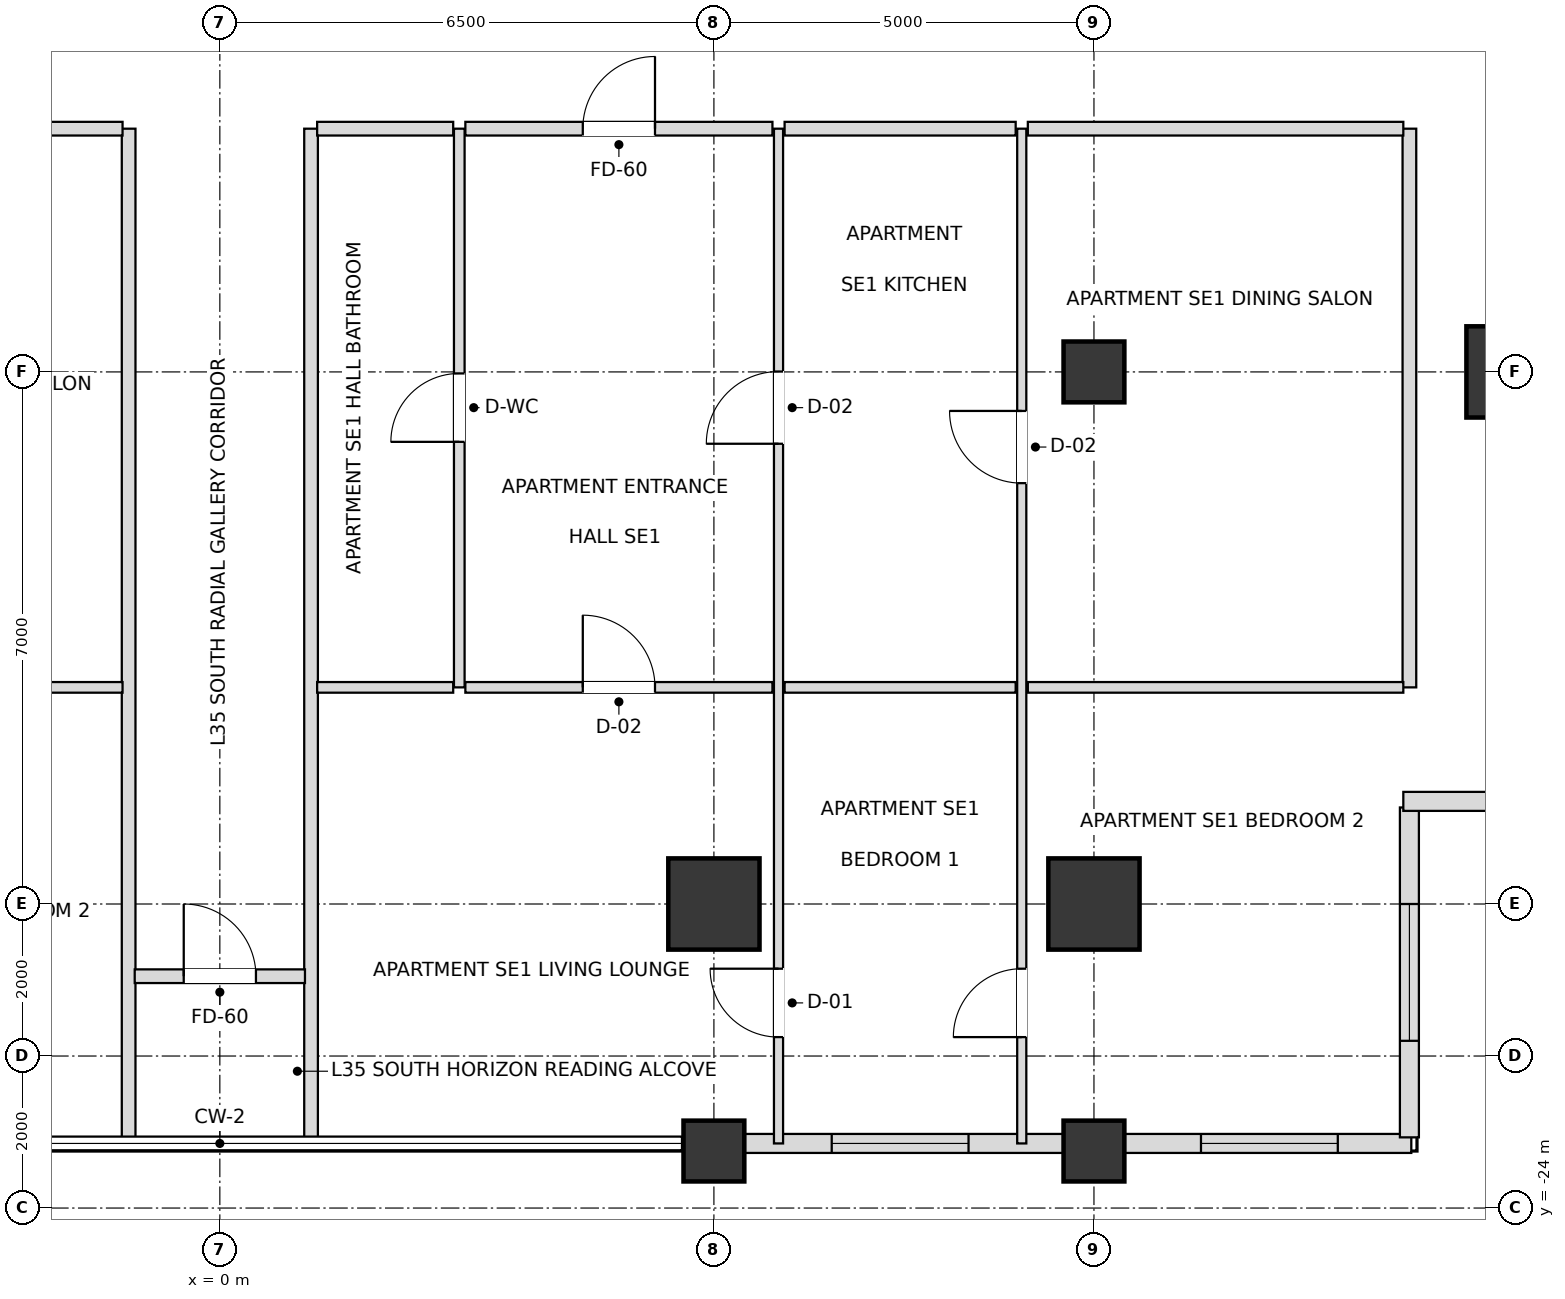
"""IFC4 building model, lengths in metres.
Left out: names, types, materials, properties, quantities, classifications, styles, units other than length and angle.
Written with IfcOpenShell. Run it as: python <this file> out.ifc"""

import sys

from ifc_helpers import new_model, si_unit, direction, frame, frame_2d, origin, origin_2d, place, context, subcontext, project, spatial, rectangle, extrude, element, fill, save


model = new_model("IFC4")
c1 = context("Model", 3, precision=1e-05, world=origin(), true_north=direction((0.0, 1.0)))
c2 = subcontext(c1, "Body", "Model", "MODEL_VIEW")
j1 = project(units=[si_unit("LENGTHUNIT", "METRE"), si_unit("PLANEANGLEUNIT", "RADIAN")], contexts=[c1])
p1 = place(None, origin())
s1 = spatial("IfcSite", under=j1, at=p1, CompositionType="ELEMENT")
p2 = place(p1, origin())
s2 = spatial("IfcBuilding", under=s1, at=p2, CompositionType="ELEMENT")
p3 = place(p2, frame((0.0, 0.0, 140.4)))
s3 = spatial("IfcBuildingStorey", under=s2, at=p3, CompositionType="ELEMENT", Elevation=140.4)
for number, where, z_axis, x_axis in (
    (1, (6.5, -20.0, 0.0), (0.0, 0.0, 1.0), (1.0, 0.0, 0.0)),
    (2, (11.5, -20.0, 0.0), (0.0, 0.0, 1.0), (1.0, 0.0, 0.0)),
    (3, (17.0, -13.0, 0.0), (0.0, 0.0, 1.0), (1.0, 0.0, 0.0)),
):
    element("IfcColumn", number, at=place(p3, frame(where, z_axis=z_axis, x_axis=x_axis)), inside=s3, PredefinedType="USERDEFINED", context=c2, shape_type="SweptSolid", body=[
        extrude(rectangle(XDim=1.2, YDim=1.2, at=origin_2d()), origin(), (0.0, 0.0, 1.0), 3.6),
    ])
for number, where, z_axis, x_axis in (
    (4, (11.5, -13.0, 0.0), (0.0, 0.0, 1.0), (1.0, 0.0, 0.0)),
    (5, (6.5, -23.25, 0.0), (0.0, 0.0, 1.0), (1.0, 0.0, 0.0)),
    (6, (11.5, -23.25, 0.0), (0.0, 0.0, 1.0), (1.0, 0.0, 0.0)),
):
    element("IfcColumn", number, at=place(p3, frame(where, z_axis=z_axis, x_axis=x_axis)), inside=s3, PredefinedType="COLUMN", context=c2, shape_type="SweptSolid", body=[
        extrude(rectangle(XDim=0.8, YDim=0.8, at=origin_2d()), origin(), (0.0, 0.0, 1.0), 3.6),
    ])
p4 = place(p3, frame((6.895, -23.15, 0.0), z_axis=(0.0, 0.0, 1.0), x_axis=(1.0, 0.0, 0.0)))
e7 = element("IfcWall", 7, at=p4, inside=s3, PredefinedType="SOLIDWALL", context=c2, shape_type="SweptSolid", body=[
    extrude(rectangle(XDim=4.21, YDim=0.25, at=frame_2d((2.105, 0.0))), origin(), (0.0, 0.0, 1.0), 2.736),
])
p5 = place(p4, frame((1.155, 0.0, 0.72)))
e8 = element("IfcOpeningElement", 8, at=p5, cuts=e7, PredefinedType="OPENING", context=c2, shape_type="SweptSolid", body=[
    extrude(rectangle(XDim=1.8, YDim=1.68, at=frame_2d((0.9, 0.84))), frame((0.0, 0.135, 0.0), z_axis=(0.0, -1.0, 0.0), x_axis=(1.0, 0.0, 0.0)), (0.0, 0.0, 1.0), 0.27),
])
p6 = place(p3, frame((11.895, -23.15, 0.0), z_axis=(0.0, 0.0, 1.0), x_axis=(1.0, 0.0, 0.0)))
e9 = element("IfcWall", 9, at=p6, inside=s3, PredefinedType="SOLIDWALL", context=c2, shape_type="SweptSolid", body=[
    extrude(rectangle(XDim=3.78, YDim=0.25, at=frame_2d((1.89, 0.0))), origin(), (0.0, 0.0, 1.0), 2.736),
])
p7 = place(p6, frame((1.013, 0.0, 0.72)))
e10 = element("IfcOpeningElement", 10, at=p7, cuts=e9, PredefinedType="OPENING", context=c2, shape_type="SweptSolid", body=[
    extrude(rectangle(XDim=1.8, YDim=1.68, at=frame_2d((0.9, 0.84))), frame((0.0, 0.135, 0.0), z_axis=(0.0, -1.0, 0.0), x_axis=(1.0, 0.0, 0.0)), (0.0, 0.0, 1.0), 0.27),
])
p8 = place(p3, frame((15.65, -23.07, 0.0), z_axis=(0.0, 0.0, 1.0), x_axis=(0.0, 1.0, 0.0)))
e11 = element("IfcWall", 11, at=p8, inside=s3, PredefinedType="SOLIDWALL", context=c2, shape_type="SweptSolid", body=[
    extrude(rectangle(XDim=4.34, YDim=0.25, at=frame_2d((2.17, 0.0))), origin(), (0.0, 0.0, 1.0), 2.736),
])
p9 = place(p8, frame((1.27, 0.0, 0.72)))
e12 = element("IfcOpeningElement", 12, at=p9, cuts=e11, PredefinedType="OPENING", context=c2, shape_type="SweptSolid", body=[
    extrude(rectangle(XDim=1.8, YDim=1.68, at=frame_2d((0.9, 0.84))), frame((0.0, 0.135, 0.0), z_axis=(0.0, -1.0, 0.0), x_axis=(1.0, 0.0, 0.0)), (0.0, 0.0, 1.0), 0.27),
])
p10 = place(p3, frame((15.57, -18.65, 0.0), z_axis=(0.0, 0.0, 1.0), x_axis=(1.0, 0.0, 0.0)))
e13 = element("IfcWall", 13, at=p10, inside=s3, PredefinedType="SOLIDWALL", context=c2, shape_type="SweptSolid", body=[
    extrude(rectangle(XDim=4.66, YDim=0.25, at=frame_2d((2.33, 0.0))), origin(), (0.0, 0.0, 1.0), 2.736),
])
p11 = place(p10, frame((1.43, 0.0, 0.72)))
e14 = element("IfcOpeningElement", 14, at=p11, cuts=e13, PredefinedType="OPENING", context=c2, shape_type="SweptSolid", body=[
    extrude(rectangle(XDim=1.8, YDim=1.68, at=frame_2d((0.9, 0.84))), frame((0.0, 0.135, 0.0), z_axis=(0.0, -1.0, 0.0), x_axis=(1.0, 0.0, 0.0)), (0.0, 0.0, 1.0), 0.27),
])
for number, where, z_axis, x_axis in (
    (15, (-1.2, -23.15, 0.0), (0.0, 0.0, 1.0), (0.0, 1.0, 0.0)),
    (16, (1.2, -23.15, 0.0), (0.0, 0.0, 1.0), (0.0, 1.0, 0.0)),
):
    element("IfcWall", number, at=place(p3, frame(where, z_axis=z_axis, x_axis=x_axis)), inside=s3, PredefinedType="PARTITIONING", context=c2, shape_type="SweptSolid", body=[
        extrude(rectangle(XDim=13.35, YDim=0.18, at=frame_2d((6.675, 0.0))), origin(), (0.0, 0.0, 1.0), 2.816),
    ])
p12 = place(p3, frame((3.15, -17.15, 0.0), z_axis=(0.0, 0.0, 1.0), x_axis=(0.0, 1.0, 0.0)))
e17 = element("IfcWall", 17, at=p12, inside=s3, PredefinedType="PARTITIONING", context=c2, shape_type="SweptSolid", body=[
    extrude(rectangle(XDim=7.35, YDim=0.14, at=frame_2d((3.675, 0.0))), origin(), (0.0, 0.0, 1.0), 3.38),
])
p13 = place(p12, frame((3.23, 0.0, 0.0)))
e18 = element("IfcOpeningElement", 18, at=p13, cuts=e17, PredefinedType="OPENING", context=c2, shape_type="SweptSolid", body=[
    extrude(rectangle(XDim=0.9, YDim=2.1, at=frame_2d((0.45, 1.05))), frame((0.0, 0.08, 0.0), z_axis=(0.0, -1.0, 0.0), x_axis=(1.0, 0.0, 0.0)), (0.0, 0.0, 1.0), 0.16),
])
p14 = place(p3, frame((7.35, -23.15, 0.0), z_axis=(0.0, 0.0, 1.0), x_axis=(0.0, 1.0, 0.0)))
e19 = element("IfcWall", 19, at=p14, inside=s3, PredefinedType="PARTITIONING", context=c2, shape_type="SweptSolid", body=[
    extrude(rectangle(XDim=13.35, YDim=0.12, at=frame_2d((6.675, 0.0))), origin(), (0.0, 0.0, 1.0), 2.816),
])
p15 = place(p14, frame((9.205, 0.0, 0.0)))
e20 = element("IfcOpeningElement", 20, at=p15, cuts=e19, PredefinedType="OPENING", context=c2, shape_type="SweptSolid", body=[
    extrude(rectangle(XDim=0.95, YDim=2.1, at=frame_2d((0.475, 1.05))), frame((0.0, 0.07, 0.0), z_axis=(0.0, -1.0, 0.0), x_axis=(1.0, 0.0, 0.0)), (0.0, 0.0, 1.0), 0.14),
])
p16 = place(p14, frame((1.399, 0.0, 0.0)))
e21 = element("IfcOpeningElement", 21, at=p16, cuts=e19, PredefinedType="OPENING", context=c2, shape_type="SweptSolid", body=[
    extrude(rectangle(XDim=0.9, YDim=2.1, at=frame_2d((0.45, 1.05))), frame((0.0, 0.07, 0.0), z_axis=(0.0, -1.0, 0.0), x_axis=(1.0, 0.0, 0.0)), (0.0, 0.0, 1.0), 0.14),
])
p17 = place(p3, frame((10.55, -23.15, 0.0), z_axis=(0.0, 0.0, 1.0), x_axis=(0.0, 1.0, 0.0)))
e22 = element("IfcWall", 22, at=p17, inside=s3, PredefinedType="PARTITIONING", context=c2, shape_type="SweptSolid", body=[
    extrude(rectangle(XDim=13.35, YDim=0.12, at=frame_2d((6.675, 0.0))), origin(), (0.0, 0.0, 1.0), 2.816),
])
p18 = place(p17, frame((8.687, 0.0, 0.0)))
e23 = element("IfcOpeningElement", 23, at=p18, cuts=e22, PredefinedType="OPENING", context=c2, shape_type="SweptSolid", body=[
    extrude(rectangle(XDim=0.95, YDim=2.1, at=frame_2d((0.475, 1.05))), frame((0.0, 0.07, 0.0), z_axis=(0.0, -1.0, 0.0), x_axis=(1.0, 0.0, 0.0)), (0.0, 0.0, 1.0), 0.14),
])
p19 = place(p17, frame((1.399, 0.0, 0.0)))
e24 = element("IfcOpeningElement", 24, at=p19, cuts=e22, PredefinedType="OPENING", context=c2, shape_type="SweptSolid", body=[
    extrude(rectangle(XDim=0.9, YDim=2.1, at=frame_2d((0.45, 1.05))), frame((0.0, 0.07, 0.0), z_axis=(0.0, -1.0, 0.0), x_axis=(1.0, 0.0, 0.0)), (0.0, 0.0, 1.0), 0.14),
])
p20 = place(p3, frame((15.65, -17.15, 0.0), z_axis=(0.0, 0.0, 1.0), x_axis=(0.0, 1.0, 0.0)))
e25 = element("IfcWall", 25, at=p20, inside=s3, PredefinedType="PARTITIONING", context=c2, shape_type="SweptSolid", body=[
    extrude(rectangle(XDim=7.35, YDim=0.18, at=frame_2d((3.675, 0.0))), origin(), (0.0, 0.0, 1.0), 2.736),
])
p21 = place(p3, frame((-1.12, -20.95, 0.0), z_axis=(0.0, 0.0, 1.0), x_axis=(1.0, 0.0, 0.0)))
e26 = element("IfcWall", 26, at=p21, inside=s3, PredefinedType="PARTITIONING", context=c2, shape_type="SweptSolid", body=[
    extrude(rectangle(XDim=2.24, YDim=0.18, at=frame_2d((1.12, 0.0))), origin(), (0.0, 0.0, 1.0), 3.38),
])
p22 = place(p21, frame((0.645, 0.0, 0.0)))
e27 = element("IfcOpeningElement", 27, at=p22, cuts=e26, PredefinedType="OPENING", context=c2, shape_type="SweptSolid", body=[
    extrude(rectangle(XDim=0.95, YDim=2.15, at=frame_2d((0.475, 1.075))), frame((0.0, 0.1, 0.0), z_axis=(0.0, -1.0, 0.0), x_axis=(1.0, 0.0, 0.0)), (0.0, 0.0, 1.0), 0.2),
])
p23 = place(p3, frame((-6.22, -17.15, 0.0), z_axis=(0.0, 0.0, 1.0), x_axis=(1.0, 0.0, 0.0)))
e28 = element("IfcWall", 28, at=p23, inside=s3, PredefinedType="PARTITIONING", context=c2, shape_type="SweptSolid", body=[
    extrude(rectangle(XDim=4.94, YDim=0.14, at=frame_2d((2.47, 0.0))), origin(), (0.0, 0.0, 1.0), 3.38),
])
p24 = place(p23, frame((1.995, 0.0, 0.0)))
e29 = element("IfcOpeningElement", 29, at=p24, cuts=e28, PredefinedType="OPENING", context=c2, shape_type="SweptSolid", body=[
    extrude(rectangle(XDim=0.95, YDim=2.1, at=frame_2d((0.475, 1.05))), frame((0.0, 0.08, 0.0), z_axis=(0.0, -1.0, 0.0), x_axis=(1.0, 0.0, 0.0)), (0.0, 0.0, 1.0), 0.16),
])
p25 = place(p3, frame((1.28, -17.15, 0.0), z_axis=(0.0, 0.0, 1.0), x_axis=(1.0, 0.0, 0.0)))
e30 = element("IfcWall", 30, at=p25, inside=s3, PredefinedType="PARTITIONING", context=c2, shape_type="SweptSolid", body=[
    extrude(rectangle(XDim=1.79, YDim=0.14, at=frame_2d((0.895, 0.0))), origin(), (0.0, 0.0, 1.0), 3.38),
])
p26 = place(p3, frame((3.23, -17.15, 0.0), z_axis=(0.0, 0.0, 1.0), x_axis=(1.0, 0.0, 0.0)))
e31 = element("IfcWall", 31, at=p26, inside=s3, PredefinedType="PARTITIONING", context=c2, shape_type="SweptSolid", body=[
    extrude(rectangle(XDim=4.04, YDim=0.14, at=frame_2d((2.02, 0.0))), origin(), (0.0, 0.0, 1.0), 2.816),
])
p27 = place(p26, frame((1.545, 0.0, 0.0)))
e32 = element("IfcOpeningElement", 32, at=p27, cuts=e31, PredefinedType="OPENING", context=c2, shape_type="SweptSolid", body=[
    extrude(rectangle(XDim=0.95, YDim=2.1, at=frame_2d((0.475, 1.05))), frame((0.0, 0.08, 0.0), z_axis=(0.0, -1.0, 0.0), x_axis=(1.0, 0.0, 0.0)), (0.0, 0.0, 1.0), 0.16),
])
p28 = place(p3, frame((7.43, -17.15, 0.0), z_axis=(0.0, 0.0, 1.0), x_axis=(1.0, 0.0, 0.0)))
e33 = element("IfcWall", 33, at=p28, inside=s3, PredefinedType="PARTITIONING", context=c2, shape_type="SweptSolid", body=[
    extrude(rectangle(XDim=3.04, YDim=0.14, at=frame_2d((1.52, 0.0))), origin(), (0.0, 0.0, 1.0), 3.38),
])
p29 = place(p3, frame((10.63, -17.15, 0.0), z_axis=(0.0, 0.0, 1.0), x_axis=(1.0, 0.0, 0.0)))
e34 = element("IfcWall", 34, at=p29, inside=s3, PredefinedType="PARTITIONING", context=c2, shape_type="SweptSolid", body=[
    extrude(rectangle(XDim=4.94, YDim=0.14, at=frame_2d((2.47, 0.0))), origin(), (0.0, 0.0, 1.0), 2.736),
])
p30 = place(p3, frame((-6.22, -9.8, 0.0), z_axis=(0.0, 0.0, 1.0), x_axis=(1.0, 0.0, 0.0)))
e35 = element("IfcWall", 35, at=p30, inside=s3, PredefinedType="PARTITIONING", context=c2, shape_type="SweptSolid", body=[
    extrude(rectangle(XDim=4.94, YDim=0.18, at=frame_2d((2.47, 0.0))), origin(), (0.0, 0.0, 1.0), 3.38),
])
p31 = place(p3, frame((1.28, -9.8, 0.0), z_axis=(0.0, 0.0, 1.0), x_axis=(1.0, 0.0, 0.0)))
e36 = element("IfcWall", 36, at=p31, inside=s3, PredefinedType="PARTITIONING", context=c2, shape_type="SweptSolid", body=[
    extrude(rectangle(XDim=1.79, YDim=0.18, at=frame_2d((0.895, 0.0))), origin(), (0.0, 0.0, 1.0), 3.38),
])
p32 = place(p3, frame((3.23, -9.8, 0.0), z_axis=(0.0, 0.0, 1.0), x_axis=(1.0, 0.0, 0.0)))
e37 = element("IfcWall", 37, at=p32, inside=s3, PredefinedType="PARTITIONING", context=c2, shape_type="SweptSolid", body=[
    extrude(rectangle(XDim=4.04, YDim=0.18, at=frame_2d((2.02, 0.0))), origin(), (0.0, 0.0, 1.0), 2.816),
])
p33 = place(p32, frame((1.545, 0.0, 0.0)))
e38 = element("IfcOpeningElement", 38, at=p33, cuts=e37, PredefinedType="OPENING", context=c2, shape_type="SweptSolid", body=[
    extrude(rectangle(XDim=0.95, YDim=2.15, at=frame_2d((0.475, 1.075))), frame((0.0, 0.1, 0.0), z_axis=(0.0, -1.0, 0.0), x_axis=(1.0, 0.0, 0.0)), (0.0, 0.0, 1.0), 0.2),
])
p34 = place(p3, frame((7.43, -9.8, 0.0), z_axis=(0.0, 0.0, 1.0), x_axis=(1.0, 0.0, 0.0)))
e39 = element("IfcWall", 39, at=p34, inside=s3, PredefinedType="PARTITIONING", context=c2, shape_type="SweptSolid", body=[
    extrude(rectangle(XDim=3.04, YDim=0.18, at=frame_2d((1.52, 0.0))), origin(), (0.0, 0.0, 1.0), 3.38),
])
p35 = place(p3, frame((10.63, -9.8, 0.0), z_axis=(0.0, 0.0, 1.0), x_axis=(1.0, 0.0, 0.0)))
e40 = element("IfcWall", 40, at=p35, inside=s3, PredefinedType="PARTITIONING", context=c2, shape_type="SweptSolid", body=[
    extrude(rectangle(XDim=4.94, YDim=0.18, at=frame_2d((2.47, 0.0))), origin(), (0.0, 0.0, 1.0), 3.38),
])
p36 = place(p5, origin())
e41 = element("IfcWindow", 41, at=p36, inside=s3, PartitioningType="SINGLE_PANEL", PredefinedType="WINDOW", context=c2, shape_type="SweptSolid", body=[
    extrude(rectangle(XDim=1.8, YDim=1.68, at=frame_2d((0.9, 0.84))), frame((0.0, 0.03, 0.0), z_axis=(0.0, -1.0, 0.0), x_axis=(1.0, 0.0, 0.0)), (0.0, 0.0, 1.0), 0.06),
])
fill(e8, e41)
p37 = place(p7, origin())
e42 = element("IfcWindow", 42, at=p37, inside=s3, PartitioningType="SINGLE_PANEL", PredefinedType="WINDOW", context=c2, shape_type="SweptSolid", body=[
    extrude(rectangle(XDim=1.8, YDim=1.68, at=frame_2d((0.9, 0.84))), frame((0.0, 0.03, 0.0), z_axis=(0.0, -1.0, 0.0), x_axis=(1.0, 0.0, 0.0)), (0.0, 0.0, 1.0), 0.06),
])
fill(e10, e42)
p38 = place(p9, origin())
e43 = element("IfcWindow", 43, at=p38, inside=s3, PartitioningType="SINGLE_PANEL", PredefinedType="WINDOW", context=c2, shape_type="SweptSolid", body=[
    extrude(rectangle(XDim=1.8, YDim=1.68, at=frame_2d((0.9, 0.84))), frame((0.0, 0.03, 0.0), z_axis=(0.0, -1.0, 0.0), x_axis=(1.0, 0.0, 0.0)), (0.0, 0.0, 1.0), 0.06),
])
fill(e12, e43)
p39 = place(p22, origin())
e44 = element("IfcDoor", 44, at=p39, inside=s3, OperationType="SINGLE_SWING_LEFT", PredefinedType="DOOR", context=c2, shape_type="SweptSolid", body=[
    extrude(rectangle(XDim=0.95, YDim=2.15, at=frame_2d((0.475, 1.075))), frame((0.0, 0.025, 0.0), z_axis=(0.0, -1.0, 0.0), x_axis=(1.0, 0.0, 0.0)), (0.0, 0.0, 1.0), 0.05),
])
fill(e27, e44)
p40 = place(p13, origin())
e45 = element("IfcDoor", 45, at=p40, inside=s3, OperationType="SINGLE_SWING_LEFT", PredefinedType="DOOR", context=c2, shape_type="SweptSolid", body=[
    extrude(rectangle(XDim=0.9, YDim=2.1, at=frame_2d((0.45, 1.05))), frame((0.0, 0.025, 0.0), z_axis=(0.0, -1.0, 0.0), x_axis=(1.0, 0.0, 0.0)), (0.0, 0.0, 1.0), 0.05),
])
fill(e18, e45)
p41 = place(p33, origin())
e46 = element("IfcDoor", 46, at=p41, inside=s3, OperationType="SINGLE_SWING_RIGHT", PredefinedType="DOOR", context=c2, shape_type="SweptSolid", body=[
    extrude(rectangle(XDim=0.95, YDim=2.15, at=frame_2d((0.475, 1.075))), frame((0.0, 0.025, 0.0), z_axis=(0.0, -1.0, 0.0), x_axis=(1.0, 0.0, 0.0)), (0.0, 0.0, 1.0), 0.05),
])
fill(e38, e46)
p42 = place(p15, origin())
e47 = element("IfcDoor", 47, at=p42, inside=s3, OperationType="SINGLE_SWING_LEFT", PredefinedType="DOOR", context=c2, shape_type="SweptSolid", body=[
    extrude(rectangle(XDim=0.95, YDim=2.1, at=frame_2d((0.475, 1.05))), frame((0.0, 0.025, 0.0), z_axis=(0.0, -1.0, 0.0), x_axis=(1.0, 0.0, 0.0)), (0.0, 0.0, 1.0), 0.05),
])
fill(e20, e47)
p43 = place(p18, origin())
e48 = element("IfcDoor", 48, at=p43, inside=s3, OperationType="SINGLE_SWING_RIGHT", PredefinedType="DOOR", context=c2, shape_type="SweptSolid", body=[
    extrude(rectangle(XDim=0.95, YDim=2.1, at=frame_2d((0.475, 1.05))), frame((0.0, 0.025, 0.0), z_axis=(0.0, -1.0, 0.0), x_axis=(1.0, 0.0, 0.0)), (0.0, 0.0, 1.0), 0.05),
])
fill(e23, e48)
p44 = place(p27, origin())
e49 = element("IfcDoor", 49, at=p44, inside=s3, OperationType="SINGLE_SWING_LEFT", PredefinedType="DOOR", context=c2, shape_type="SweptSolid", body=[
    extrude(rectangle(XDim=0.95, YDim=2.1, at=frame_2d((0.475, 1.05))), frame((0.0, 0.025, 0.0), z_axis=(0.0, -1.0, 0.0), x_axis=(1.0, 0.0, 0.0)), (0.0, 0.0, 1.0), 0.05),
])
fill(e32, e49)
p45 = place(p16, origin())
e50 = element("IfcDoor", 50, at=p45, inside=s3, OperationType="SINGLE_SWING_RIGHT", PredefinedType="DOOR", context=c2, shape_type="SweptSolid", body=[
    extrude(rectangle(XDim=0.9, YDim=2.1, at=frame_2d((0.45, 1.05))), frame((0.0, 0.025, 0.0), z_axis=(0.0, -1.0, 0.0), x_axis=(1.0, 0.0, 0.0)), (0.0, 0.0, 1.0), 0.05),
])
fill(e21, e50)
p46 = place(p19, origin())
e51 = element("IfcDoor", 51, at=p46, inside=s3, OperationType="SINGLE_SWING_LEFT", PredefinedType="DOOR", context=c2, shape_type="SweptSolid", body=[
    extrude(rectangle(XDim=0.9, YDim=2.1, at=frame_2d((0.45, 1.05))), frame((0.0, 0.025, 0.0), z_axis=(0.0, -1.0, 0.0), x_axis=(1.0, 0.0, 0.0)), (0.0, 0.0, 1.0), 0.05),
])
fill(e24, e51)
save(model, sys.argv[1])
